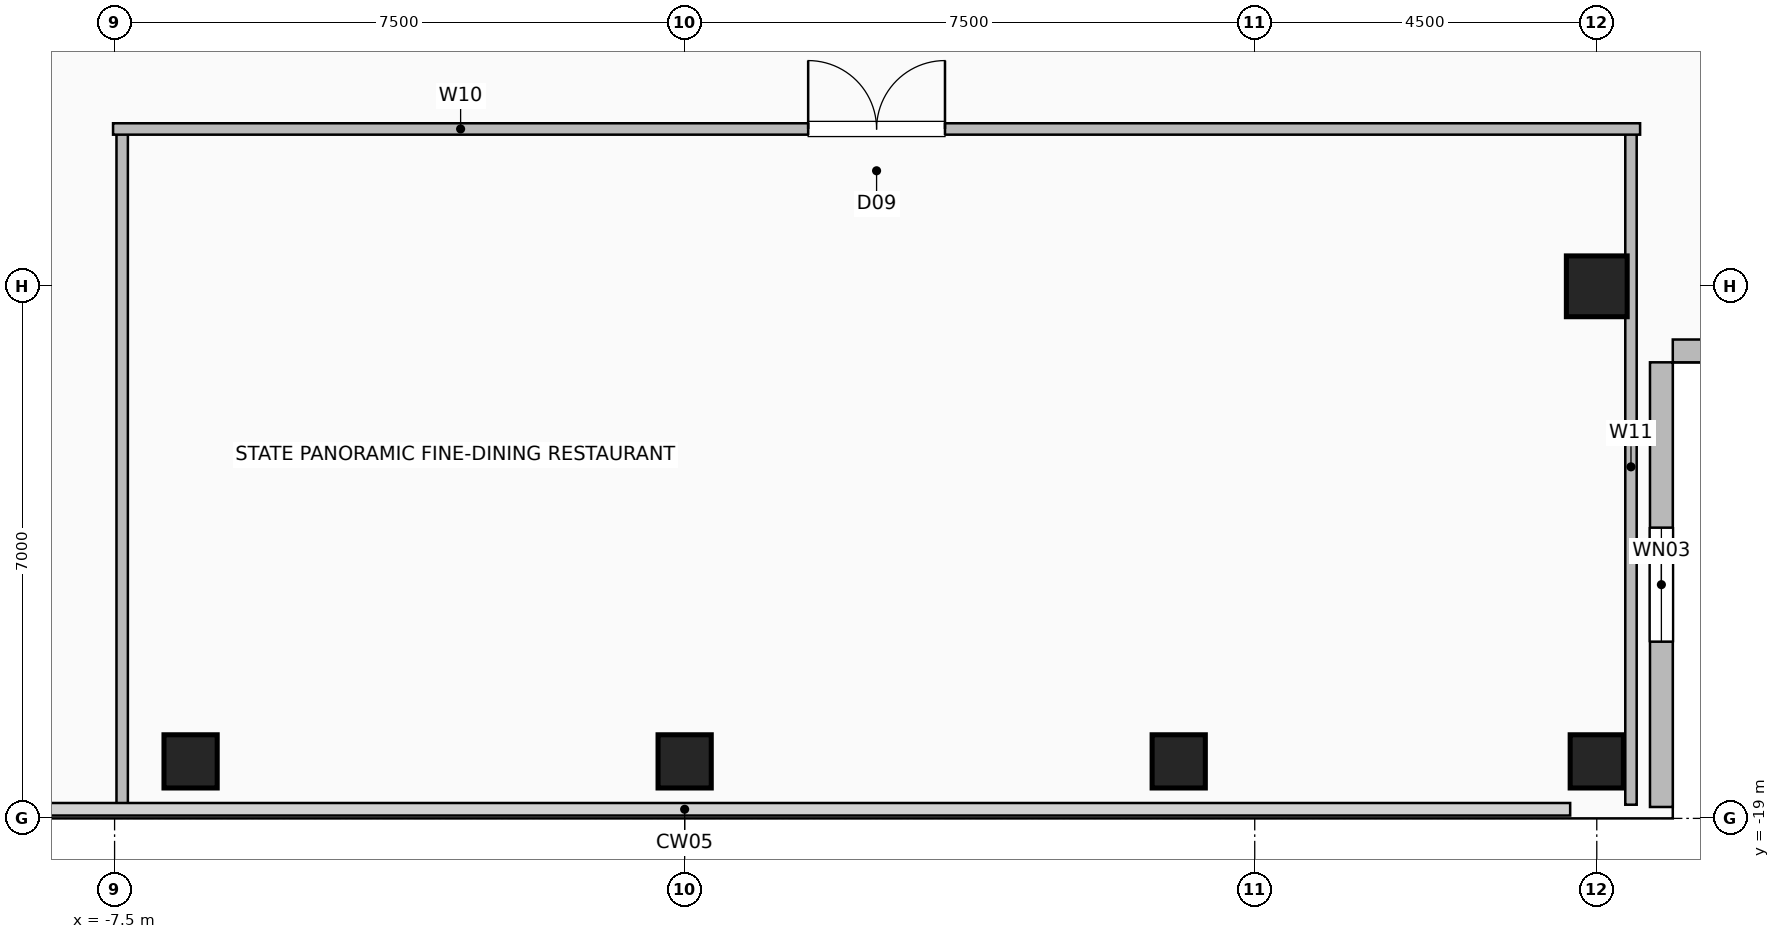
"""IFC4 building model, lengths in metres.
Left out: names, types, materials, properties, quantities, classifications, styles, units other than length and angle.
Written with IfcOpenShell. Run it as: python <this file> out.ifc"""

import sys

from ifc_helpers import new_model, si_unit, direction, frame, frame_2d, origin, origin_2d, place, context, subcontext, project, spatial, rectangle, hollow_rectangle, extrude, element, fill, save


model = new_model("IFC4")
c1 = context("Model", 3, precision=1e-05, world=origin(), true_north=direction((0.0, 1.0)))
c2 = subcontext(c1, "Body", "Model", "MODEL_VIEW")
j1 = project(units=[si_unit("LENGTHUNIT", "METRE"), si_unit("PLANEANGLEUNIT", "RADIAN")], contexts=[c1])
p1 = place(None, origin())
s1 = spatial("IfcSite", under=j1, at=p1, CompositionType="ELEMENT")
p2 = place(p1, origin())
s2 = spatial("IfcBuilding", under=s1, at=p2, CompositionType="ELEMENT")
p3 = place(p2, frame((0.0, 0.0, 254.0)))
s3 = spatial("IfcBuildingStorey", under=s2, at=p3, CompositionType="ELEMENT", Elevation=254.0)
for number, where, z_axis, x_axis in (
    (1, (-6.5, -18.25, 0.0), (0.0, 0.0, 1.0), (1.0, 0.0, 0.0)),
    (2, (0.0, -18.25, 0.0), (0.0, 0.0, 1.0), (1.0, 0.0, 0.0)),
    (3, (6.5, -18.25, 0.0), (0.0, 0.0, 1.0), (1.0, 0.0, 0.0)),
    (4, (12.0, -18.25, 0.0), (0.0, 0.0, 1.0), (1.0, 0.0, 0.0)),
):
    element("IfcColumn", number, at=place(p3, frame(where, z_axis=z_axis, x_axis=x_axis)), inside=s3, PredefinedType="COLUMN", context=c2, shape_type="SweptSolid", body=[
        extrude(hollow_rectangle(XDim=0.7, YDim=0.7, WallThickness=0.035, at=origin_2d()), origin(), (0.0, 0.0, 1.0), 3.6),
    ])
p4 = place(p3, frame((12.0, -12.0, 0.0), z_axis=(0.0, 0.0, 1.0), x_axis=(1.0, 0.0, 0.0)))
e5 = element("IfcColumn", 5, at=p4, inside=s3, PredefinedType="COLUMN", context=c2, shape_type="SweptSolid", body=[
    extrude(hollow_rectangle(XDim=0.8, YDim=0.8, WallThickness=0.04, at=origin_2d()), origin(), (0.0, 0.0, 1.0), 3.6),
])
p5 = place(p3, frame((12.85, -18.85, 0.0), z_axis=(0.0, 0.0, 1.0), x_axis=(0.0, 1.0, 0.0)))
e6 = element("IfcWall", 6, at=p5, inside=s3, PredefinedType="SOLIDWALL", context=c2, shape_type="SweptSolid", body=[
    extrude(rectangle(XDim=5.85, YDim=0.3, at=frame_2d((2.925, 0.0))), origin(), (0.0, 0.0, 1.0), 3.36),
])
p6 = place(p5, frame((2.175, 0.0, 0.9)))
e7 = element("IfcOpeningElement", 7, at=p6, cuts=e6, PredefinedType="OPENING", context=c2, shape_type="SweptSolid", body=[
    extrude(rectangle(XDim=1.5, YDim=1.8, at=frame_2d((0.75, 0.9))), frame((0.0, 0.16, 0.0), z_axis=(0.0, -1.0, 0.0), x_axis=(1.0, 0.0, 0.0)), (0.0, 0.0, 1.0), 0.32),
])
p7 = place(p3, frame((18.85, -12.85, 0.0), z_axis=(0.0, 0.0, 1.0), x_axis=(-1.0, 0.0, 0.0)))
e8 = element("IfcWall", 8, at=p7, inside=s3, PredefinedType="SOLIDWALL", context=c2, shape_type="SweptSolid", body=[
    extrude(rectangle(XDim=5.85, YDim=0.3, at=frame_2d((2.925, 0.0))), origin(), (0.0, 0.0, 1.0), 3.36),
])
for number, where, z_axis, x_axis in (
    (9, (-7.4, -18.82, 0.0), (0.0, 0.0, 1.0), (0.0, 1.0, 0.0)),
    (10, (12.45, -18.82, 0.0), (0.0, 0.0, 1.0), (0.0, 1.0, 0.0)),
):
    element("IfcWall", number, at=place(p3, frame(where, z_axis=z_axis, x_axis=x_axis)), inside=s3, PredefinedType="PARTITIONING", context=c2, shape_type="SweptSolid", body=[
        extrude(rectangle(XDim=8.89, YDim=0.15, at=frame_2d((4.445, 0.0))), origin(), (0.0, 0.0, 1.0), 3.36),
    ])
p8 = place(p3, frame((-7.52, -9.93, 0.0), z_axis=(0.0, 0.0, 1.0), x_axis=(1.0, 0.0, 0.0)))
e11 = element("IfcWall", 11, at=p8, inside=s3, PredefinedType="PARTITIONING", context=c2, shape_type="SweptSolid", body=[
    extrude(rectangle(XDim=20.09, YDim=0.15, at=frame_2d((10.045, 0.0))), origin(), (0.0, 0.0, 1.0), 3.36),
])
p9 = place(p8, frame((9.145, 0.0, 0.0)))
e12 = element("IfcOpeningElement", 12, at=p9, cuts=e11, PredefinedType="OPENING", context=c2, shape_type="SweptSolid", body=[
    extrude(rectangle(XDim=1.8, YDim=2.08, at=frame_2d((0.9, 1.04))), frame((0.0, 0.085, 0.0), z_axis=(0.0, -1.0, 0.0), x_axis=(1.0, 0.0, 0.0)), (0.0, 0.0, 1.0), 0.17),
])
p10 = place(p6, origin())
e13 = element("IfcWindow", 13, at=p10, inside=s3, PartitioningType="SINGLE_PANEL", PredefinedType="WINDOW", context=c2, shape_type="SweptSolid", body=[
    extrude(rectangle(XDim=1.5, YDim=1.8, at=frame_2d((0.75, 0.9))), frame((0.0, 0.03, 0.0), z_axis=(0.0, -1.0, 0.0), x_axis=(1.0, 0.0, 0.0)), (0.0, 0.0, 1.0), 0.06),
])
fill(e7, e13)
p11 = place(p9, origin())
e14 = element("IfcDoor", 14, at=p11, inside=s3, OperationType="DOUBLE_DOOR_SINGLE_SWING", PredefinedType="DOOR", context=c2, shape_type="SweptSolid", body=[
    extrude(rectangle(XDim=1.8, YDim=2.08, at=frame_2d((0.9, 1.04))), frame((0.0, 0.025, 0.0), z_axis=(0.0, -1.0, 0.0), x_axis=(1.0, 0.0, 0.0)), (0.0, 0.0, 1.0), 0.05),
])
fill(e12, e14)
save(model, sys.argv[1])
